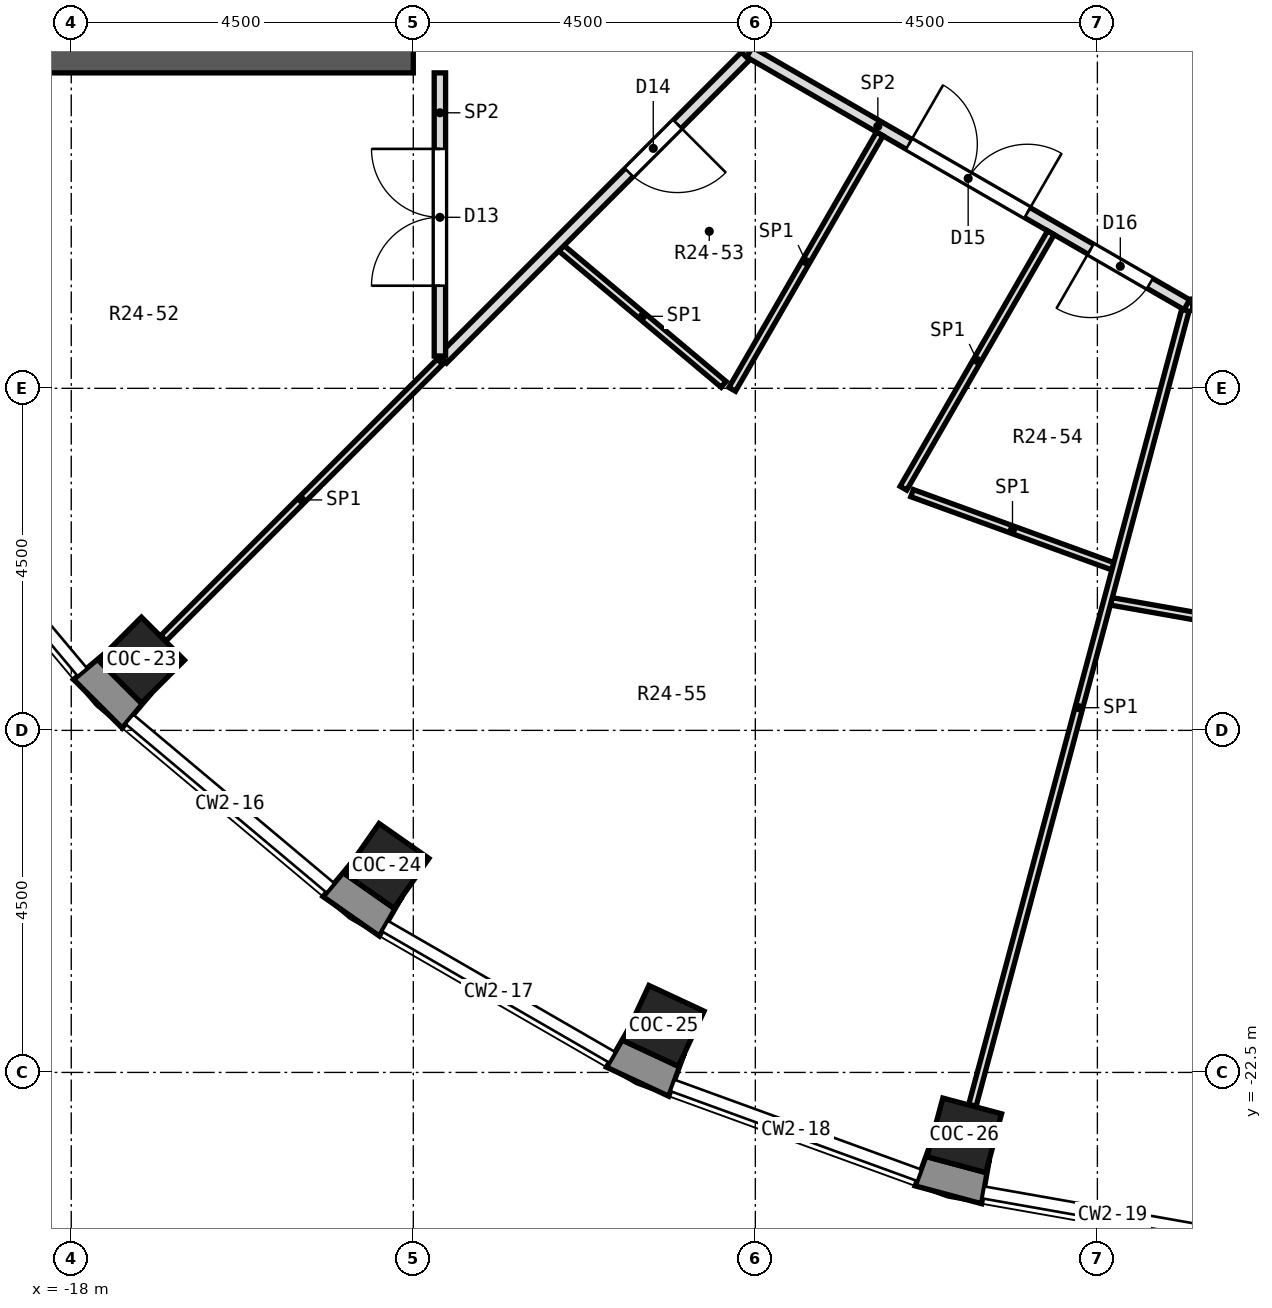
"""IFC4 building model, lengths in metres.
Left out: names, types, materials, properties, quantities, classifications, styles, units other than length and angle.
Written with IfcOpenShell. Run it as: python <this file> out.ifc"""

import sys

from ifc_helpers import new_model, si_unit, direction, frame, frame_2d, origin, origin_2d, place, context, subcontext, project, spatial, polyline, rectangle, outline, extrude, element, fill, save


model = new_model("IFC4")
c1 = context("Model", 3, precision=1e-05, world=origin(), true_north=direction((0.0, 1.0)))
c2 = subcontext(c1, "Body", "Model", "MODEL_VIEW")
j1 = project(units=[si_unit("LENGTHUNIT", "METRE"), si_unit("PLANEANGLEUNIT", "RADIAN")], contexts=[c1])
p1 = place(None, origin())
s1 = spatial("IfcSite", under=j1, at=p1, CompositionType="ELEMENT")
p2 = place(p1, origin())
s2 = spatial("IfcBuilding", under=s1, at=p2, CompositionType="ELEMENT")
p3 = place(p2, frame((0.0, 0.0, 155.8)))
s3 = spatial("IfcBuildingStorey", under=s2, at=p3, CompositionType="ELEMENT", Elevation=155.8)
for number, where, z_axis, x_axis in (
    (1, (-17.077, -17.077, -0.55), (0.0, 0.0, 1.0), (-0.707, -0.707, 0.0)),
    (2, (-13.852, -19.782, -0.55), (0.0, 0.0, 1.0), (-0.574, -0.819, 0.0)),
    (3, (-10.206, -21.887, -0.55), (0.0, 0.0, 1.0), (-0.423, -0.906, 0.0)),
    (4, (-6.25, -23.327, -0.55), (0.0, 0.0, 1.0), (-0.259, -0.966, 0.0)),
):
    element("IfcColumn", number, at=place(p3, frame(where, z_axis=z_axis, x_axis=x_axis)), inside=s3, PredefinedType="COLUMN", context=c2, shape_type="SweptSolid", body=[
        extrude(rectangle(XDim=0.8, YDim=0.8, at=origin_2d()), origin(), (0.0, 0.0, 1.0), 5.55),
    ])
p4 = place(p3, frame((-13.5, -9.0, 0.0), z_axis=(0.0, 0.0, 1.0), x_axis=(-1.0, 0.0, 0.0)))
e5 = element("IfcWall", 5, at=p4, inside=s3, PredefinedType="SHEAR", context=c2, shape_type="SweptSolid", body=[
    extrude(rectangle(XDim=8.0, YDim=0.7, at=frame_2d((4.0, 0.0))), origin(), (0.0, 0.0, 1.0), 5.0),
])
p5 = place(p3, origin())
e6 = element("IfcWall", 6, at=p5, inside=s3, PredefinedType="SOLIDWALL", context=c2, shape_type="SweptSolid", body=[
    extrude(outline(polyline([(-17.33, -17.969), (-16.944, -17.51), (-17.077, -17.642), (-17.642, -17.077), (-17.51, -16.944), (-17.969, -17.33), (-17.33, -17.969)])), origin(), (0.0, 0.0, 1.0), 4.55),
])
p6 = place(p3, origin())
e7 = element("IfcWall", 7, at=p6, inside=s3, PredefinedType="SOLIDWALL", context=c2, shape_type="SweptSolid", body=[
    extrude(outline(polyline([(-14.687, -20.187), (-13.946, -20.706), (-13.646, -20.186), (-13.754, -20.34), (-14.409, -19.881), (-14.302, -19.727), (-14.687, -20.187)])), origin(), (0.0, 0.0, 1.0), 4.55),
])
p7 = place(p3, origin())
e8 = element("IfcWall", 8, at=p7, inside=s3, PredefinedType="SOLIDWALL", context=c2, shape_type="SweptSolid", body=[
    extrude(outline(polyline([(-10.139, -22.813), (-9.934, -22.249), (-10.013, -22.419), (-10.738, -22.081), (-10.659, -21.911), (-10.959, -22.431), (-10.139, -22.813)])), origin(), (0.0, 0.0, 1.0), 4.55),
])
p8 = place(p3, origin())
e9 = element("IfcWall", 9, at=p8, inside=s3, PredefinedType="SOLIDWALL", context=c2, shape_type="SweptSolid", body=[
    extrude(outline(polyline([(-6.023, -24.227), (-5.919, -23.636), (-5.968, -23.817), (-6.74, -23.61), (-6.692, -23.429), (-6.897, -23.993), (-6.023, -24.227)])), origin(), (0.0, 0.0, 1.0), 4.55),
])
p9 = place(p3, frame((-11.552, -11.657, 0.0), z_axis=(0.0, 0.0, 1.0), x_axis=(0.766098290504, -0.642723431413, 0.0)))
e10 = element("IfcWall", 10, at=p9, inside=s3, PredefinedType="PARTITIONING", context=c2, shape_type="SweptSolid", body=[
    extrude(rectangle(XDim=2.786, YDim=0.1, at=frame_2d((1.393, 0.0))), origin(), (0.0, 0.0, 1.0), 4.55),
])
p10 = place(p3, frame((-9.077, -9.077, 0.0), z_axis=(0.0, 0.0, 1.0), x_axis=(0.865961614908, -0.500110469302, 0.0)))
e11 = element("IfcWall", 11, at=p10, inside=s3, PredefinedType="PARTITIONING", context=c2, shape_type="SweptSolid", body=[
    extrude(rectangle(XDim=6.645, YDim=0.15, at=frame_2d((3.322, 0.0))), origin(), (0.0, 0.0, 1.0), 4.55),
])
p11 = place(p10, frame((2.422, 0.0, 0.0)))
e12 = element("IfcOpeningElement", 12, at=p11, cuts=e11, PredefinedType="OPENING", context=c2, shape_type="SweptSolid", body=[
    extrude(rectangle(XDim=1.8, YDim=2.1, at=frame_2d((0.9, 1.05))), frame((0.0, 0.087, 0.0), z_axis=(0.0, -1.0, 0.0), x_axis=(1.0, 0.0, 0.0)), (0.0, 0.0, 1.0), 0.174),
])
p12 = place(p10, frame((5.184, 0.0, 0.0)))
e13 = element("IfcOpeningElement", 13, at=p12, cuts=e11, PredefinedType="OPENING", context=c2, shape_type="SweptSolid", body=[
    extrude(rectangle(XDim=0.9, YDim=2.1, at=frame_2d((0.45, 1.05))), frame((0.0, 0.087, 0.0), z_axis=(0.0, -1.0, 0.0), x_axis=(1.0, 0.0, 0.0)), (0.0, 0.0, 1.0), 0.174),
])
p13 = place(p3, frame((-6.938, -14.879, 0.0), z_axis=(0.0, 0.0, 1.0), x_axis=(0.939661525863, -0.342105563842, 0.0)))
e14 = element("IfcWall", 14, at=p13, inside=s3, PredefinedType="PARTITIONING", context=c2, shape_type="SweptSolid", body=[
    extrude(rectangle(XDim=2.812, YDim=0.1, at=frame_2d((1.406, 0.0))), origin(), (0.0, 0.0, 1.0), 4.55),
])
p14 = place(p3, frame((-4.317, -16.303, 0.0), z_axis=(0.0, 0.0, 1.0), x_axis=(0.984792910243, -0.173732334166, 0.0)))
e15 = element("IfcWall", 15, at=p14, inside=s3, PredefinedType="PARTITIONING", context=c2, shape_type="SweptSolid", body=[
    extrude(rectangle(XDim=2.891, YDim=0.1, at=frame_2d((1.445, 0.0))), origin(), (0.0, 0.0, 1.0), 4.55),
])
p15 = place(p3, frame((-16.787, -16.787, 0.0), z_axis=(0.0, 0.0, 1.0), x_axis=(0.707106781187, 0.707106781187, 0.0)))
e16 = element("IfcWall", 16, at=p15, inside=s3, PredefinedType="PARTITIONING", context=c2, shape_type="SweptSolid", body=[
    extrude(rectangle(XDim=5.143, YDim=0.1, at=frame_2d((2.572, 0.0))), origin(), (0.0, 0.0, 1.0), 4.55),
])
p16 = place(p3, frame((-13.115, -13.115, 0.0), z_axis=(0.0, 0.0, 1.0), x_axis=(0.707106781187, 0.707106781187, 0.0)))
e17 = element("IfcWall", 17, at=p16, inside=s3, PredefinedType="PARTITIONING", context=c2, shape_type="SweptSolid", body=[
    extrude(rectangle(XDim=5.635, YDim=0.15, at=frame_2d((2.817, 0.0))), origin(), (0.0, 0.0, 1.0), 4.55),
])
p17 = place(p16, frame((3.47, 0.0, 0.0)))
e18 = element("IfcOpeningElement", 18, at=p17, cuts=e17, PredefinedType="OPENING", context=c2, shape_type="SweptSolid", body=[
    extrude(rectangle(XDim=0.9, YDim=2.1, at=frame_2d((0.45, 1.05))), frame((0.0, 0.087, 0.0), z_axis=(0.0, -1.0, 0.0), x_axis=(1.0, 0.0, 0.0)), (0.0, 0.0, 1.0), 0.174),
])
p18 = place(p3, frame((-7.052, -14.814, 0.0), z_axis=(0.0, 0.0, 1.0), x_axis=(0.499922173165, 0.866070332466, 0.0)))
e19 = element("IfcWall", 19, at=p18, inside=s3, PredefinedType="PARTITIONING", context=c2, shape_type="SweptSolid", body=[
    extrude(rectangle(XDim=3.88, YDim=0.1, at=frame_2d((1.94, 0.0))), origin(), (0.0, 0.0, 1.0), 4.55),
])
p19 = place(p3, frame((-9.304, -13.513, 0.0), z_axis=(0.0, 0.0, 1.0), x_axis=(0.500185351818, 0.865918364412, 0.0)))
e20 = element("IfcWall", 20, at=p19, inside=s3, PredefinedType="PARTITIONING", context=c2, shape_type="SweptSolid", body=[
    extrude(rectangle(XDim=3.88, YDim=0.1, at=frame_2d((1.94, 0.0))), origin(), (0.0, 0.0, 1.0), 4.55),
])
p20 = place(p3, frame((-6.144, -22.931, 0.0), z_axis=(0.0, 0.0, 1.0), x_axis=(0.258715046682, 0.965953686582, 0.0)))
e21 = element("IfcWall", 21, at=p20, inside=s3, PredefinedType="PARTITIONING", context=c2, shape_type="SweptSolid", body=[
    extrude(rectangle(XDim=10.828, YDim=0.1, at=frame_2d((5.414, 0.0))), origin(), (0.0, 0.0, 1.0), 4.55),
])
p21 = place(p3, frame((-13.15, -13.075, 0.0), z_axis=(0.0, 0.0, 1.0), x_axis=(0.0, 1.0, 0.0)))
e22 = element("IfcWall", 22, at=p21, inside=s3, PredefinedType="PARTITIONING", context=c2, shape_type="SweptSolid", body=[
    extrude(rectangle(XDim=3.725, YDim=0.15, at=frame_2d((1.862, 0.0))), origin(), (0.0, 0.0, 1.0), 4.55),
])
p22 = place(p21, frame((0.925, 0.0, 0.0)))
e23 = element("IfcOpeningElement", 23, at=p22, cuts=e22, PredefinedType="OPENING", context=c2, shape_type="SweptSolid", body=[
    extrude(rectangle(XDim=1.8, YDim=2.1, at=frame_2d((0.9, 1.05))), frame((0.0, 0.087, 0.0), z_axis=(0.0, -1.0, 0.0), x_axis=(1.0, 0.0, 0.0)), (0.0, 0.0, 1.0), 0.174),
])
p23 = place(p22, origin())
e24 = element("IfcDoor", 24, at=p23, inside=s3, OperationType="DOUBLE_DOOR_SINGLE_SWING", PredefinedType="DOOR", context=c2, shape_type="SweptSolid", body=[
    extrude(rectangle(XDim=1.8, YDim=2.1, at=frame_2d((0.9, 1.05))), frame((0.0, 0.025, 0.0), z_axis=(0.0, -1.0, 0.0), x_axis=(1.0, 0.0, 0.0)), (0.0, 0.0, 1.0), 0.05),
])
fill(e23, e24)
p24 = place(p17, frame((0.9, 0.0, 0.0), z_axis=(0.0, 0.0, 1.0), x_axis=(-1.0, 0.0, 0.0)))
e25 = element("IfcDoor", 25, at=p24, inside=s3, OperationType="SINGLE_SWING_LEFT", PredefinedType="DOOR", context=c2, shape_type="SweptSolid", body=[
    extrude(rectangle(XDim=0.9, YDim=2.1, at=frame_2d((0.45, 1.05))), frame((0.0, 0.025, 0.0), z_axis=(0.0, -1.0, 0.0), x_axis=(1.0, 0.0, 0.0)), (0.0, 0.0, 1.0), 0.05),
])
fill(e18, e25)
p25 = place(p11, origin())
e26 = element("IfcDoor", 26, at=p25, inside=s3, OperationType="DOUBLE_DOOR_SINGLE_SWING", PredefinedType="DOOR", context=c2, shape_type="SweptSolid", body=[
    extrude(rectangle(XDim=1.8, YDim=2.1, at=frame_2d((0.9, 1.05))), frame((0.0, 0.025, 0.0), z_axis=(0.0, -1.0, 0.0), x_axis=(1.0, 0.0, 0.0)), (0.0, 0.0, 1.0), 0.05),
])
fill(e12, e26)
p26 = place(p12, frame((0.9, 0.0, 0.0), z_axis=(0.0, 0.0, 1.0), x_axis=(-1.0, 0.0, 0.0)))
e27 = element("IfcDoor", 27, at=p26, inside=s3, OperationType="SINGLE_SWING_RIGHT", PredefinedType="DOOR", context=c2, shape_type="SweptSolid", body=[
    extrude(rectangle(XDim=0.9, YDim=2.1, at=frame_2d((0.45, 1.05))), frame((0.0, 0.025, 0.0), z_axis=(0.0, -1.0, 0.0), x_axis=(1.0, 0.0, 0.0)), (0.0, 0.0, 1.0), 0.05),
])
fill(e13, e27)
save(model, sys.argv[1])
